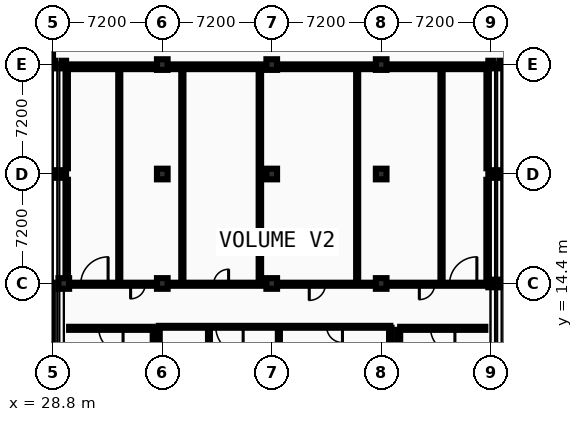
"""IFC4 building model, lengths in metres.
Left out: names, types, materials, properties, quantities, classifications, styles, units other than length and angle.
Written with IfcOpenShell. Run it as: python <this file> out.ifc"""

import sys

from ifc_helpers import new_model, si_unit, direction, frame, frame_2d, origin, origin_2d, place, context, subcontext, project, spatial, rectangle, i_section, extrude, element, fill, save


model = new_model("IFC4")
c1 = context("Model", 3, precision=1e-05, world=origin(), true_north=direction((0.0, 1.0)))
c2 = subcontext(c1, "Body", "Model", "MODEL_VIEW")
j1 = project(units=[si_unit("LENGTHUNIT", "METRE"), si_unit("PLANEANGLEUNIT", "RADIAN")], contexts=[c1])
p1 = place(None, origin())
s1 = spatial("IfcSite", under=j1, at=p1, CompositionType="ELEMENT")
p2 = place(p1, origin())
s2 = spatial("IfcBuilding", under=s1, at=p2, CompositionType="ELEMENT")
p3 = place(p2, frame((0.0, 0.0, -4.8)))
s3 = spatial("IfcBuildingStorey", under=s2, at=p3, CompositionType="ELEMENT", Elevation=-4.8)
for number, where, z_axis, x_axis in (
    (1, (28.8, 21.6, 0.0), (0.0, 0.0, 1.0), (1.0, 0.0, 0.0)),
    (2, (28.8, 28.8, 0.0), (0.0, 0.0, 1.0), (1.0, 0.0, 0.0)),
):
    element("IfcColumn", number, at=place(p3, frame(where, z_axis=z_axis, x_axis=x_axis)), inside=s3, PredefinedType="COLUMN", context=c2, shape_type="SweptSolid", body=[
        extrude(i_section(OverallWidth=0.3, OverallDepth=0.5, WebThickness=0.014, FlangeThickness=0.028, FilletRadius=0.027, at=origin_2d()), origin(), (0.0, 0.0, 1.0), 4.8),
    ])
p4 = place(p3, frame((29.52, 14.4, 0.0), z_axis=(0.0, 0.0, 1.0), x_axis=(1.0, 0.0, 0.0)))
e3 = element("IfcColumn", 3, at=p4, inside=s3, PredefinedType="COLUMN", context=c2, shape_type="SweptSolid", body=[
    extrude(rectangle(XDim=0.7, YDim=0.7, at=origin_2d()), origin(), (0.0, 0.0, 1.0), 4.8),
])
for number, where, z_axis, x_axis in (
    (4, (29.52, 21.6, 0.0), (0.0, 0.0, 1.0), (1.0, 0.0, 0.0)),
    (5, (29.52, 28.8, 0.0), (0.0, 0.0, 1.0), (1.0, 0.0, 0.0)),
):
    element("IfcColumn", number, at=place(p3, frame(where, z_axis=z_axis, x_axis=x_axis)), inside=s3, PredefinedType="COLUMN", context=c2, shape_type="SweptSolid", body=[
        extrude(i_section(OverallWidth=0.3, OverallDepth=0.5, WebThickness=0.014, FlangeThickness=0.028, FilletRadius=0.027, at=origin_2d()), origin(), (0.0, 0.0, 1.0), 4.8),
    ])
for number, where, z_axis, x_axis in (
    (6, (36.0, 14.4, 0.0), (0.0, 0.0, 1.0), (1.0, 0.0, 0.0)),
    (7, (36.0, 21.6, 0.0), (0.0, 0.0, 1.0), (1.0, 0.0, 0.0)),
    (8, (36.0, 28.8, 0.0), (0.0, 0.0, 1.0), (1.0, 0.0, 0.0)),
    (9, (43.2, 14.4, 0.0), (0.0, 0.0, 1.0), (1.0, 0.0, 0.0)),
    (10, (43.2, 21.6, 0.0), (0.0, 0.0, 1.0), (1.0, 0.0, 0.0)),
    (11, (43.2, 28.8, 0.0), (0.0, 0.0, 1.0), (1.0, 0.0, 0.0)),
    (12, (50.4, 14.4, 0.0), (0.0, 0.0, 1.0), (1.0, 0.0, 0.0)),
    (13, (50.4, 21.6, 0.0), (0.0, 0.0, 1.0), (1.0, 0.0, 0.0)),
    (14, (50.4, 28.8, 0.0), (0.0, 0.0, 1.0), (1.0, 0.0, 0.0)),
):
    element("IfcColumn", number, at=place(p3, frame(where, z_axis=z_axis, x_axis=x_axis)), inside=s3, PredefinedType="COLUMN", context=c2, shape_type="SweptSolid", body=[
        extrude(rectangle(XDim=0.7, YDim=0.7, at=origin_2d()), origin(), (0.0, 0.0, 1.0), 4.8),
    ])
for number, where, z_axis, x_axis in (
    (15, (57.6, 14.4, 0.0), (0.0, 0.0, 1.0), (1.0, 0.0, 0.0)),
    (16, (57.6, 21.6, 0.0), (0.0, 0.0, 1.0), (1.0, 0.0, 0.0)),
    (17, (57.6, 28.8, 0.0), (0.0, 0.0, 1.0), (1.0, 0.0, 0.0)),
    (18, (58.32, 14.4, 0.0), (0.0, 0.0, 1.0), (1.0, 0.0, 0.0)),
    (19, (58.32, 21.6, 0.0), (0.0, 0.0, 1.0), (1.0, 0.0, 0.0)),
    (20, (58.32, 28.8, 0.0), (0.0, 0.0, 1.0), (1.0, 0.0, 0.0)),
):
    element("IfcColumn", number, at=place(p3, frame(where, z_axis=z_axis, x_axis=x_axis)), inside=s3, PredefinedType="COLUMN", context=c2, shape_type="SweptSolid", body=[
        extrude(i_section(OverallWidth=0.3, OverallDepth=0.5, WebThickness=0.014, FlangeThickness=0.028, FilletRadius=0.027, at=origin_2d()), origin(), (0.0, 0.0, 1.0), 4.8),
    ])
p5 = place(p3, frame((28.6, 5.85, 0.0), z_axis=(0.0, 0.0, 1.0), x_axis=(0.0, 1.0, 0.0)))
e21 = element("IfcWall", 21, at=p5, inside=s3, PredefinedType="SHEAR", context=c2, shape_type="SweptSolid", body=[
    extrude(rectangle(XDim=8.6, YDim=0.4, at=frame_2d((4.3, 0.0))), origin(), (0.0, 0.0, 1.0), 4.545),
])
p6 = place(p3, frame((29.87, 11.45, 0.0), z_axis=(0.0, 0.0, 1.0), x_axis=(1.0, 0.0, 0.0)))
e22 = element("IfcWall", 22, at=p6, inside=s3, PredefinedType="PARTITIONING", context=c2, shape_type="SweptSolid", body=[
    extrude(rectangle(XDim=5.5, YDim=0.2, at=frame_2d((2.75, 0.0))), origin(), (0.0, 0.0, 1.0), 4.545),
])
p7 = place(p6, frame((1.95, 0.0, 0.0)))
e23 = element("IfcOpeningElement", 23, at=p7, cuts=e22, PredefinedType="OPENING", context=c2, shape_type="SweptSolid", body=[
    extrude(rectangle(XDim=1.6, YDim=2.2, at=frame_2d((0.8, 1.1))), frame((0.0, 0.11, 0.0), z_axis=(0.0, -1.0, 0.0), x_axis=(1.0, 0.0, 0.0)), (0.0, 0.0, 1.0), 0.22),
])
p8 = place(p3, frame((35.47, 8.9, 0.0), z_axis=(0.0, 0.0, 1.0), x_axis=(0.0, 1.0, 0.0)))
e24 = element("IfcWall", 24, at=p8, inside=s3, PredefinedType="PARTITIONING", context=c2, shape_type="SweptSolid", body=[
    extrude(rectangle(XDim=2.45, YDim=0.2, at=frame_2d((1.225, 0.0))), origin(), (0.0, 0.0, 1.0), 4.545),
])
p9 = place(p3, frame((51.65, 11.45, 0.0), z_axis=(0.0, 0.0, 1.0), x_axis=(1.0, 0.0, 0.0)))
e25 = element("IfcWall", 25, at=p9, inside=s3, PredefinedType="PARTITIONING", context=c2, shape_type="SweptSolid", body=[
    extrude(rectangle(XDim=5.6, YDim=0.2, at=frame_2d((2.8, 0.0))), origin(), (0.0, 0.0, 1.0), 4.545),
])
p10 = place(p9, frame((2.0, 0.0, 0.0)))
e26 = element("IfcOpeningElement", 26, at=p10, cuts=e25, PredefinedType="OPENING", context=c2, shape_type="SweptSolid", body=[
    extrude(rectangle(XDim=1.6, YDim=2.2, at=frame_2d((0.8, 1.1))), frame((0.0, 0.11, 0.0), z_axis=(0.0, -1.0, 0.0), x_axis=(1.0, 0.0, 0.0)), (0.0, 0.0, 1.0), 0.22),
])
p11 = place(p3, frame((51.55, 8.9, 0.0), z_axis=(0.0, 0.0, 1.0), x_axis=(0.0, 1.0, 0.0)))
e27 = element("IfcWall", 27, at=p11, inside=s3, PredefinedType="PARTITIONING", context=c2, shape_type="SweptSolid", body=[
    extrude(rectangle(XDim=2.45, YDim=0.2, at=frame_2d((1.225, 0.0))), origin(), (0.0, 0.0, 1.0), 4.545),
])
p12 = place(p3, frame((35.77, 11.55, 0.0), z_axis=(0.0, 0.0, 1.0), x_axis=(1.0, 0.0, 0.0)))
e28 = element("IfcWall", 28, at=p12, inside=s3, PredefinedType="PARTITIONING", context=c2, shape_type="SweptSolid", body=[
    extrude(rectangle(XDim=15.23, YDim=0.125, at=frame_2d((7.615, 0.0))), origin(), (0.0, 0.0, 1.0), 4.545),
])
p13 = place(p12, frame((1.85, 0.0, 0.0)))
e29 = element("IfcOpeningElement", 29, at=p13, cuts=e28, PredefinedType="OPENING", context=c2, shape_type="SweptSolid", body=[
    extrude(rectangle(XDim=1.0, YDim=2.1, at=frame_2d((0.5, 1.05))), frame((0.0, 0.073, 0.0), z_axis=(0.0, -1.0, 0.0), x_axis=(1.0, 0.0, 0.0)), (0.0, 0.0, 1.0), 0.145),
])
p14 = place(p12, frame((3.75, 0.0, 0.0)))
e30 = element("IfcOpeningElement", 30, at=p14, cuts=e28, PredefinedType="OPENING", context=c2, shape_type="SweptSolid", body=[
    extrude(rectangle(XDim=1.8, YDim=2.3, at=frame_2d((0.9, 1.15))), frame((0.0, 0.073, 0.0), z_axis=(0.0, -1.0, 0.0), x_axis=(1.0, 0.0, 0.0)), (0.0, 0.0, 1.0), 0.145),
])
p15 = place(p12, frame((11.047, 0.0, 0.0)))
e31 = element("IfcOpeningElement", 31, at=p15, cuts=e28, PredefinedType="OPENING", context=c2, shape_type="SweptSolid", body=[
    extrude(rectangle(XDim=1.036, YDim=2.04, at=frame_2d((0.518, 1.02))), frame((0.0, 0.073, 0.0), z_axis=(0.0, -1.0, 0.0), x_axis=(1.0, 0.0, 0.0)), (0.0, 0.0, 1.0), 0.145),
])
p16 = place(p3, frame((29.9, 14.35, 0.0), z_axis=(0.0, 0.0, 1.0), x_axis=(1.0, 0.0, 0.0)))
e32 = element("IfcWall", 32, at=p16, inside=s3, PredefinedType="PARTITIONING", context=c2, shape_type="SweptSolid", body=[
    extrude(rectangle(XDim=5.72, YDim=0.2, at=frame_2d((2.86, 0.0))), origin(), (0.0, 0.0, 1.0), 4.095),
])
p17 = place(p16, frame((0.735, 0.0, 0.0)))
e33 = element("IfcOpeningElement", 33, at=p17, cuts=e32, PredefinedType="OPENING", context=c2, shape_type="SweptSolid", body=[
    extrude(rectangle(XDim=1.8, YDim=2.3, at=frame_2d((0.9, 1.15))), frame((0.0, 0.11, 0.0), z_axis=(0.0, -1.0, 0.0), x_axis=(1.0, 0.0, 0.0)), (0.0, 0.0, 1.0), 0.22),
])
p18 = place(p16, frame((4.016, 0.0, 0.0)))
e34 = element("IfcOpeningElement", 34, at=p18, cuts=e32, PredefinedType="OPENING", context=c2, shape_type="SweptSolid", body=[
    extrude(rectangle(XDim=0.958, YDim=2.04, at=frame_2d((0.479, 1.02))), frame((0.0, 0.11, 0.0), z_axis=(0.0, -1.0, 0.0), x_axis=(1.0, 0.0, 0.0)), (0.0, 0.0, 1.0), 0.22),
])
p19 = place(p3, frame((36.38, 14.35, 0.0), z_axis=(0.0, 0.0, 1.0), x_axis=(1.0, 0.0, 0.0)))
e35 = element("IfcWall", 35, at=p19, inside=s3, PredefinedType="PARTITIONING", context=c2, shape_type="SweptSolid", body=[
    extrude(rectangle(XDim=6.44, YDim=0.2, at=frame_2d((3.22, 0.0))), origin(), (0.0, 0.0, 1.0), 4.095),
])
p20 = place(p19, frame((2.998, 0.0, 0.0)))
e36 = element("IfcOpeningElement", 36, at=p20, cuts=e35, PredefinedType="OPENING", context=c2, shape_type="SweptSolid", body=[
    extrude(rectangle(XDim=0.984, YDim=2.04, at=frame_2d((0.492, 1.02))), frame((0.0, 0.11, 0.0), z_axis=(0.0, -1.0, 0.0), x_axis=(1.0, 0.0, 0.0)), (0.0, 0.0, 1.0), 0.22),
])
p21 = place(p3, frame((43.58, 14.35, 0.0), z_axis=(0.0, 0.0, 1.0), x_axis=(1.0, 0.0, 0.0)))
e37 = element("IfcWall", 37, at=p21, inside=s3, PredefinedType="PARTITIONING", context=c2, shape_type="SweptSolid", body=[
    extrude(rectangle(XDim=6.44, YDim=0.2, at=frame_2d((3.22, 0.0))), origin(), (0.0, 0.0, 1.0), 4.095),
])
p22 = place(p21, frame((2.089, 0.0, 0.0)))
e38 = element("IfcOpeningElement", 38, at=p22, cuts=e37, PredefinedType="OPENING", context=c2, shape_type="SweptSolid", body=[
    extrude(rectangle(XDim=1.062, YDim=2.04, at=frame_2d((0.531, 1.02))), frame((0.0, 0.11, 0.0), z_axis=(0.0, -1.0, 0.0), x_axis=(1.0, 0.0, 0.0)), (0.0, 0.0, 1.0), 0.22),
])
p23 = place(p3, frame((50.78, 14.35, 0.0), z_axis=(0.0, 0.0, 1.0), x_axis=(1.0, 0.0, 0.0)))
e39 = element("IfcWall", 39, at=p23, inside=s3, PredefinedType="PARTITIONING", context=c2, shape_type="SweptSolid", body=[
    extrude(rectangle(XDim=6.44, YDim=0.2, at=frame_2d((3.22, 0.0))), origin(), (0.0, 0.0, 1.0), 4.095),
])
p24 = place(p23, frame((4.115, 0.0, 0.0)))
e40 = element("IfcOpeningElement", 40, at=p24, cuts=e39, PredefinedType="OPENING", context=c2, shape_type="SweptSolid", body=[
    extrude(rectangle(XDim=1.8, YDim=2.3, at=frame_2d((0.9, 1.15))), frame((0.0, 0.11, 0.0), z_axis=(0.0, -1.0, 0.0), x_axis=(1.0, 0.0, 0.0)), (0.0, 0.0, 1.0), 0.22),
])
p25 = place(p23, frame((2.13, 0.0, 0.0)))
e41 = element("IfcOpeningElement", 41, at=p25, cuts=e39, PredefinedType="OPENING", context=c2, shape_type="SweptSolid", body=[
    extrude(rectangle(XDim=1.01, YDim=2.04, at=frame_2d((0.505, 1.02))), frame((0.0, 0.11, 0.0), z_axis=(0.0, -1.0, 0.0), x_axis=(1.0, 0.0, 0.0)), (0.0, 0.0, 1.0), 0.22),
])
p26 = place(p3, frame((29.9, 28.6, 0.0), z_axis=(0.0, 0.0, 1.0), x_axis=(1.0, 0.0, 0.0)))
e42 = element("IfcWall", 42, at=p26, inside=s3, PredefinedType="PARTITIONING", context=c2, shape_type="SweptSolid", body=[
    extrude(rectangle(XDim=5.72, YDim=0.2, at=frame_2d((2.86, 0.0))), origin(), (0.0, 0.0, 1.0), 4.095),
])
p27 = place(p3, frame((36.38, 28.6, 0.0), z_axis=(0.0, 0.0, 1.0), x_axis=(1.0, 0.0, 0.0)))
e43 = element("IfcWall", 43, at=p27, inside=s3, PredefinedType="PARTITIONING", context=c2, shape_type="SweptSolid", body=[
    extrude(rectangle(XDim=6.44, YDim=0.2, at=frame_2d((3.22, 0.0))), origin(), (0.0, 0.0, 1.0), 4.095),
])
for number, where, z_axis, x_axis in (
    (44, (43.58, 28.6, 0.0), (0.0, 0.0, 1.0), (1.0, 0.0, 0.0)),
    (45, (50.78, 28.6, 0.0), (0.0, 0.0, 1.0), (1.0, 0.0, 0.0)),
):
    element("IfcWall", number, at=place(p3, frame(where, z_axis=z_axis, x_axis=x_axis)), inside=s3, PredefinedType="PARTITIONING", context=c2, shape_type="SweptSolid", body=[
        extrude(rectangle(XDim=6.44, YDim=0.2, at=frame_2d((3.22, 0.0))), origin(), (0.0, 0.0, 1.0), 4.095),
    ])
p28 = place(p3, frame((29.72, 14.78, 0.0), z_axis=(0.0, 0.0, 1.0), x_axis=(0.0, 1.0, 0.0)))
e46 = element("IfcWall", 46, at=p28, inside=s3, PredefinedType="PARTITIONING", context=c2, shape_type="SweptSolid", body=[
    extrude(rectangle(XDim=6.44, YDim=0.15, at=frame_2d((3.22, 0.0))), origin(), (0.0, 0.0, 1.0), 4.245),
])
p29 = place(p3, frame((29.72, 21.98, 0.0), z_axis=(0.0, 0.0, 1.0), x_axis=(0.0, 1.0, 0.0)))
e47 = element("IfcWall", 47, at=p29, inside=s3, PredefinedType="PARTITIONING", context=c2, shape_type="SweptSolid", body=[
    extrude(rectangle(XDim=6.44, YDim=0.142, at=frame_2d((3.22, 0.0))), origin(), (0.0, 0.0, 1.0), 4.245),
])
p30 = place(p3, frame((33.17, 14.45, 0.0), z_axis=(0.0, 0.0, 1.0), x_axis=(0.0, 1.0, 0.0)))
e48 = element("IfcWall", 48, at=p30, inside=s3, PredefinedType="PARTITIONING", context=c2, shape_type="SweptSolid", body=[
    extrude(rectangle(XDim=14.05, YDim=0.135, at=frame_2d((7.025, 0.0))), origin(), (0.0, 0.0, 1.0), 4.545),
])
p31 = place(p3, frame((35.77, 9.075, 0.0), z_axis=(0.0, 0.0, 1.0), x_axis=(0.0, 1.0, 0.0)))
e49 = element("IfcWall", 49, at=p31, inside=s3, PredefinedType="PARTITIONING", context=c2, shape_type="SweptSolid", body=[
    extrude(rectangle(XDim=2.413, YDim=0.125, at=frame_2d((1.206, 0.0))), origin(), (0.0, 0.0, 1.0), 4.245),
])
p32 = place(p3, frame((37.32, 14.45, 0.0), z_axis=(0.0, 0.0, 1.0), x_axis=(0.0, 1.0, 0.0)))
e50 = element("IfcWall", 50, at=p32, inside=s3, PredefinedType="PARTITIONING", context=c2, shape_type="SweptSolid", body=[
    extrude(rectangle(XDim=14.05, YDim=0.142, at=frame_2d((7.025, 0.0))), origin(), (0.0, 0.0, 1.0), 4.545),
])
p33 = place(p3, frame((39.07, 0.4, 0.0), z_axis=(0.0, 0.0, 1.0), x_axis=(0.0, 1.0, 0.0)))
e51 = element("IfcWall", 51, at=p33, inside=s3, PredefinedType="PARTITIONING", context=c2, shape_type="SweptSolid", body=[
    extrude(rectangle(XDim=11.088, YDim=0.125, at=frame_2d((5.544, 0.0))), origin(), (0.0, 0.0, 1.0), 4.545),
])
p34 = place(p3, frame((42.42, 14.45, 0.0), z_axis=(0.0, 0.0, 1.0), x_axis=(0.0, 1.0, 0.0)))
e52 = element("IfcWall", 52, at=p34, inside=s3, PredefinedType="PARTITIONING", context=c2, shape_type="SweptSolid", body=[
    extrude(rectangle(XDim=14.05, YDim=0.16, at=frame_2d((7.025, 0.0))), origin(), (0.0, 0.0, 1.0), 4.545),
])
p35 = place(p3, frame((43.67, 0.4, 0.0), z_axis=(0.0, 0.0, 1.0), x_axis=(0.0, 1.0, 0.0)))
e53 = element("IfcWall", 53, at=p35, inside=s3, PredefinedType="PARTITIONING", context=c2, shape_type="SweptSolid", body=[
    extrude(rectangle(XDim=11.088, YDim=0.135, at=frame_2d((5.544, 0.0))), origin(), (0.0, 0.0, 1.0), 4.545),
])
p36 = place(p3, frame((48.82, 14.45, 0.0), z_axis=(0.0, 0.0, 1.0), x_axis=(0.0, 1.0, 0.0)))
e54 = element("IfcWall", 54, at=p36, inside=s3, PredefinedType="PARTITIONING", context=c2, shape_type="SweptSolid", body=[
    extrude(rectangle(XDim=14.05, YDim=0.135, at=frame_2d((7.025, 0.0))), origin(), (0.0, 0.0, 1.0), 4.545),
])
p37 = place(p3, frame((51.0, 9.56, 0.0), z_axis=(0.0, 0.0, 1.0), x_axis=(0.0, 1.0, 0.0)))
e55 = element("IfcWall", 55, at=p37, inside=s3, PredefinedType="PARTITIONING", context=c2, shape_type="SweptSolid", body=[
    extrude(rectangle(XDim=1.927, YDim=0.16, at=frame_2d((0.964, 0.0))), origin(), (0.0, 0.0, 1.0), 4.545),
])
p38 = place(p3, frame((54.37, 14.45, 0.0), z_axis=(0.0, 0.0, 1.0), x_axis=(0.0, 1.0, 0.0)))
e56 = element("IfcWall", 56, at=p38, inside=s3, PredefinedType="PARTITIONING", context=c2, shape_type="SweptSolid", body=[
    extrude(rectangle(XDim=14.05, YDim=0.142, at=frame_2d((7.025, 0.0))), origin(), (0.0, 0.0, 1.0), 4.545),
])
p39 = place(p3, frame((57.4, 14.78, 0.0), z_axis=(0.0, 0.0, 1.0), x_axis=(0.0, 1.0, 0.0)))
e57 = element("IfcWall", 57, at=p39, inside=s3, PredefinedType="PARTITIONING", context=c2, shape_type="SweptSolid", body=[
    extrude(rectangle(XDim=6.44, YDim=0.16, at=frame_2d((3.22, 0.0))), origin(), (0.0, 0.0, 1.0), 4.245),
])
p40 = place(p3, frame((57.4, 21.98, 0.0), z_axis=(0.0, 0.0, 1.0), x_axis=(0.0, 1.0, 0.0)))
e58 = element("IfcWall", 58, at=p40, inside=s3, PredefinedType="PARTITIONING", context=c2, shape_type="SweptSolid", body=[
    extrude(rectangle(XDim=6.44, YDim=0.15, at=frame_2d((3.22, 0.0))), origin(), (0.0, 0.0, 1.0), 4.245),
])
p41 = place(p7, origin())
e59 = element("IfcDoor", 59, at=p41, inside=s3, OperationType="DOUBLE_DOOR_SINGLE_SWING", PredefinedType="DOOR", context=c2, shape_type="SweptSolid", body=[
    extrude(rectangle(XDim=1.6, YDim=2.2, at=frame_2d((0.8, 1.1))), frame((0.0, 0.025, 0.0), z_axis=(0.0, -1.0, 0.0), x_axis=(1.0, 0.0, 0.0)), (0.0, 0.0, 1.0), 0.05),
])
fill(e23, e59)
p42 = place(p10, origin())
e60 = element("IfcDoor", 60, at=p42, inside=s3, OperationType="DOUBLE_DOOR_SINGLE_SWING", PredefinedType="DOOR", context=c2, shape_type="SweptSolid", body=[
    extrude(rectangle(XDim=1.6, YDim=2.2, at=frame_2d((0.8, 1.1))), frame((0.0, 0.025, 0.0), z_axis=(0.0, -1.0, 0.0), x_axis=(1.0, 0.0, 0.0)), (0.0, 0.0, 1.0), 0.05),
])
fill(e26, e60)
p43 = place(p13, origin())
e61 = element("IfcDoor", 61, at=p43, inside=s3, OperationType="SLIDING_TO_LEFT", PredefinedType="DOOR", context=c2, shape_type="SweptSolid", body=[
    extrude(rectangle(XDim=1.0, YDim=2.1, at=frame_2d((0.5, 1.05))), frame((0.0, 0.025, 0.0), z_axis=(0.0, -1.0, 0.0), x_axis=(1.0, 0.0, 0.0)), (0.0, 0.0, 1.0), 0.05),
])
fill(e29, e61)
p44 = place(p24, frame((1.8, 0.0, 0.0), z_axis=(0.0, 0.0, 1.0), x_axis=(-1.0, 0.0, 0.0)))
e62 = element("IfcDoor", 62, at=p44, inside=s3, OperationType="DOUBLE_DOOR_SINGLE_SWING", PredefinedType="DOOR", context=c2, shape_type="SweptSolid", body=[
    extrude(rectangle(XDim=1.8, YDim=2.3, at=frame_2d((0.9, 1.15))), frame((0.0, 0.025, 0.0), z_axis=(0.0, -1.0, 0.0), x_axis=(1.0, 0.0, 0.0)), (0.0, 0.0, 1.0), 0.05),
])
fill(e40, e62)
p45 = place(p17, frame((1.8, 0.0, 0.0), z_axis=(0.0, 0.0, 1.0), x_axis=(-1.0, 0.0, 0.0)))
e63 = element("IfcDoor", 63, at=p45, inside=s3, OperationType="DOUBLE_DOOR_SINGLE_SWING", PredefinedType="DOOR", context=c2, shape_type="SweptSolid", body=[
    extrude(rectangle(XDim=1.8, YDim=2.3, at=frame_2d((0.9, 1.15))), frame((0.0, 0.025, 0.0), z_axis=(0.0, -1.0, 0.0), x_axis=(1.0, 0.0, 0.0)), (0.0, 0.0, 1.0), 0.05),
])
fill(e33, e63)
p46 = place(p14, origin())
e64 = element("IfcDoor", 64, at=p46, inside=s3, OperationType="DOUBLE_DOOR_SINGLE_SWING", PredefinedType="DOOR", context=c2, shape_type="SweptSolid", body=[
    extrude(rectangle(XDim=1.8, YDim=2.3, at=frame_2d((0.9, 1.15))), frame((0.0, 0.025, 0.0), z_axis=(0.0, -1.0, 0.0), x_axis=(1.0, 0.0, 0.0)), (0.0, 0.0, 1.0), 0.05),
])
fill(e30, e64)
p47 = place(p18, frame((0.958, 0.0, 0.0), z_axis=(0.0, 0.0, 1.0), x_axis=(-1.0, 0.0, 0.0)))
e65 = element("IfcDoor", 65, at=p47, inside=s3, OperationType="SINGLE_SWING_LEFT", PredefinedType="DOOR", context=c2, shape_type="SweptSolid", body=[
    extrude(rectangle(XDim=0.958, YDim=2.04, at=frame_2d((0.479, 1.02))), frame((0.0, 0.025, 0.0), z_axis=(0.0, -1.0, 0.0), x_axis=(1.0, 0.0, 0.0)), (0.0, 0.0, 1.0), 0.05),
])
fill(e34, e65)
p48 = place(p20, frame((0.984, 0.0, 0.0), z_axis=(0.0, 0.0, 1.0), x_axis=(-1.0, 0.0, 0.0)))
e66 = element("IfcDoor", 66, at=p48, inside=s3, OperationType="SINGLE_SWING_RIGHT", PredefinedType="DOOR", context=c2, shape_type="SweptSolid", body=[
    extrude(rectangle(XDim=0.984, YDim=2.04, at=frame_2d((0.492, 1.02))), frame((0.0, 0.025, 0.0), z_axis=(0.0, -1.0, 0.0), x_axis=(1.0, 0.0, 0.0)), (0.0, 0.0, 1.0), 0.05),
])
fill(e36, e66)
p49 = place(p25, frame((1.01, 0.0, 0.0), z_axis=(0.0, 0.0, 1.0), x_axis=(-1.0, 0.0, 0.0)))
e67 = element("IfcDoor", 67, at=p49, inside=s3, OperationType="SINGLE_SWING_LEFT", PredefinedType="DOOR", context=c2, shape_type="SweptSolid", body=[
    extrude(rectangle(XDim=1.01, YDim=2.04, at=frame_2d((0.505, 1.02))), frame((0.0, 0.025, 0.0), z_axis=(0.0, -1.0, 0.0), x_axis=(1.0, 0.0, 0.0)), (0.0, 0.0, 1.0), 0.05),
])
fill(e41, e67)
p50 = place(p15, origin())
e68 = element("IfcDoor", 68, at=p50, inside=s3, OperationType="SINGLE_SWING_RIGHT", PredefinedType="DOOR", context=c2, shape_type="SweptSolid", body=[
    extrude(rectangle(XDim=1.036, YDim=2.04, at=frame_2d((0.518, 1.02))), frame((0.0, 0.025, 0.0), z_axis=(0.0, -1.0, 0.0), x_axis=(1.0, 0.0, 0.0)), (0.0, 0.0, 1.0), 0.05),
])
fill(e31, e68)
p51 = place(p22, frame((1.062, 0.0, 0.0), z_axis=(0.0, 0.0, 1.0), x_axis=(-1.0, 0.0, 0.0)))
e69 = element("IfcDoor", 69, at=p51, inside=s3, OperationType="SINGLE_SWING_LEFT", PredefinedType="DOOR", context=c2, shape_type="SweptSolid", body=[
    extrude(rectangle(XDim=1.062, YDim=2.04, at=frame_2d((0.531, 1.02))), frame((0.0, 0.025, 0.0), z_axis=(0.0, -1.0, 0.0), x_axis=(1.0, 0.0, 0.0)), (0.0, 0.0, 1.0), 0.05),
])
fill(e38, e69)
save(model, sys.argv[1])
